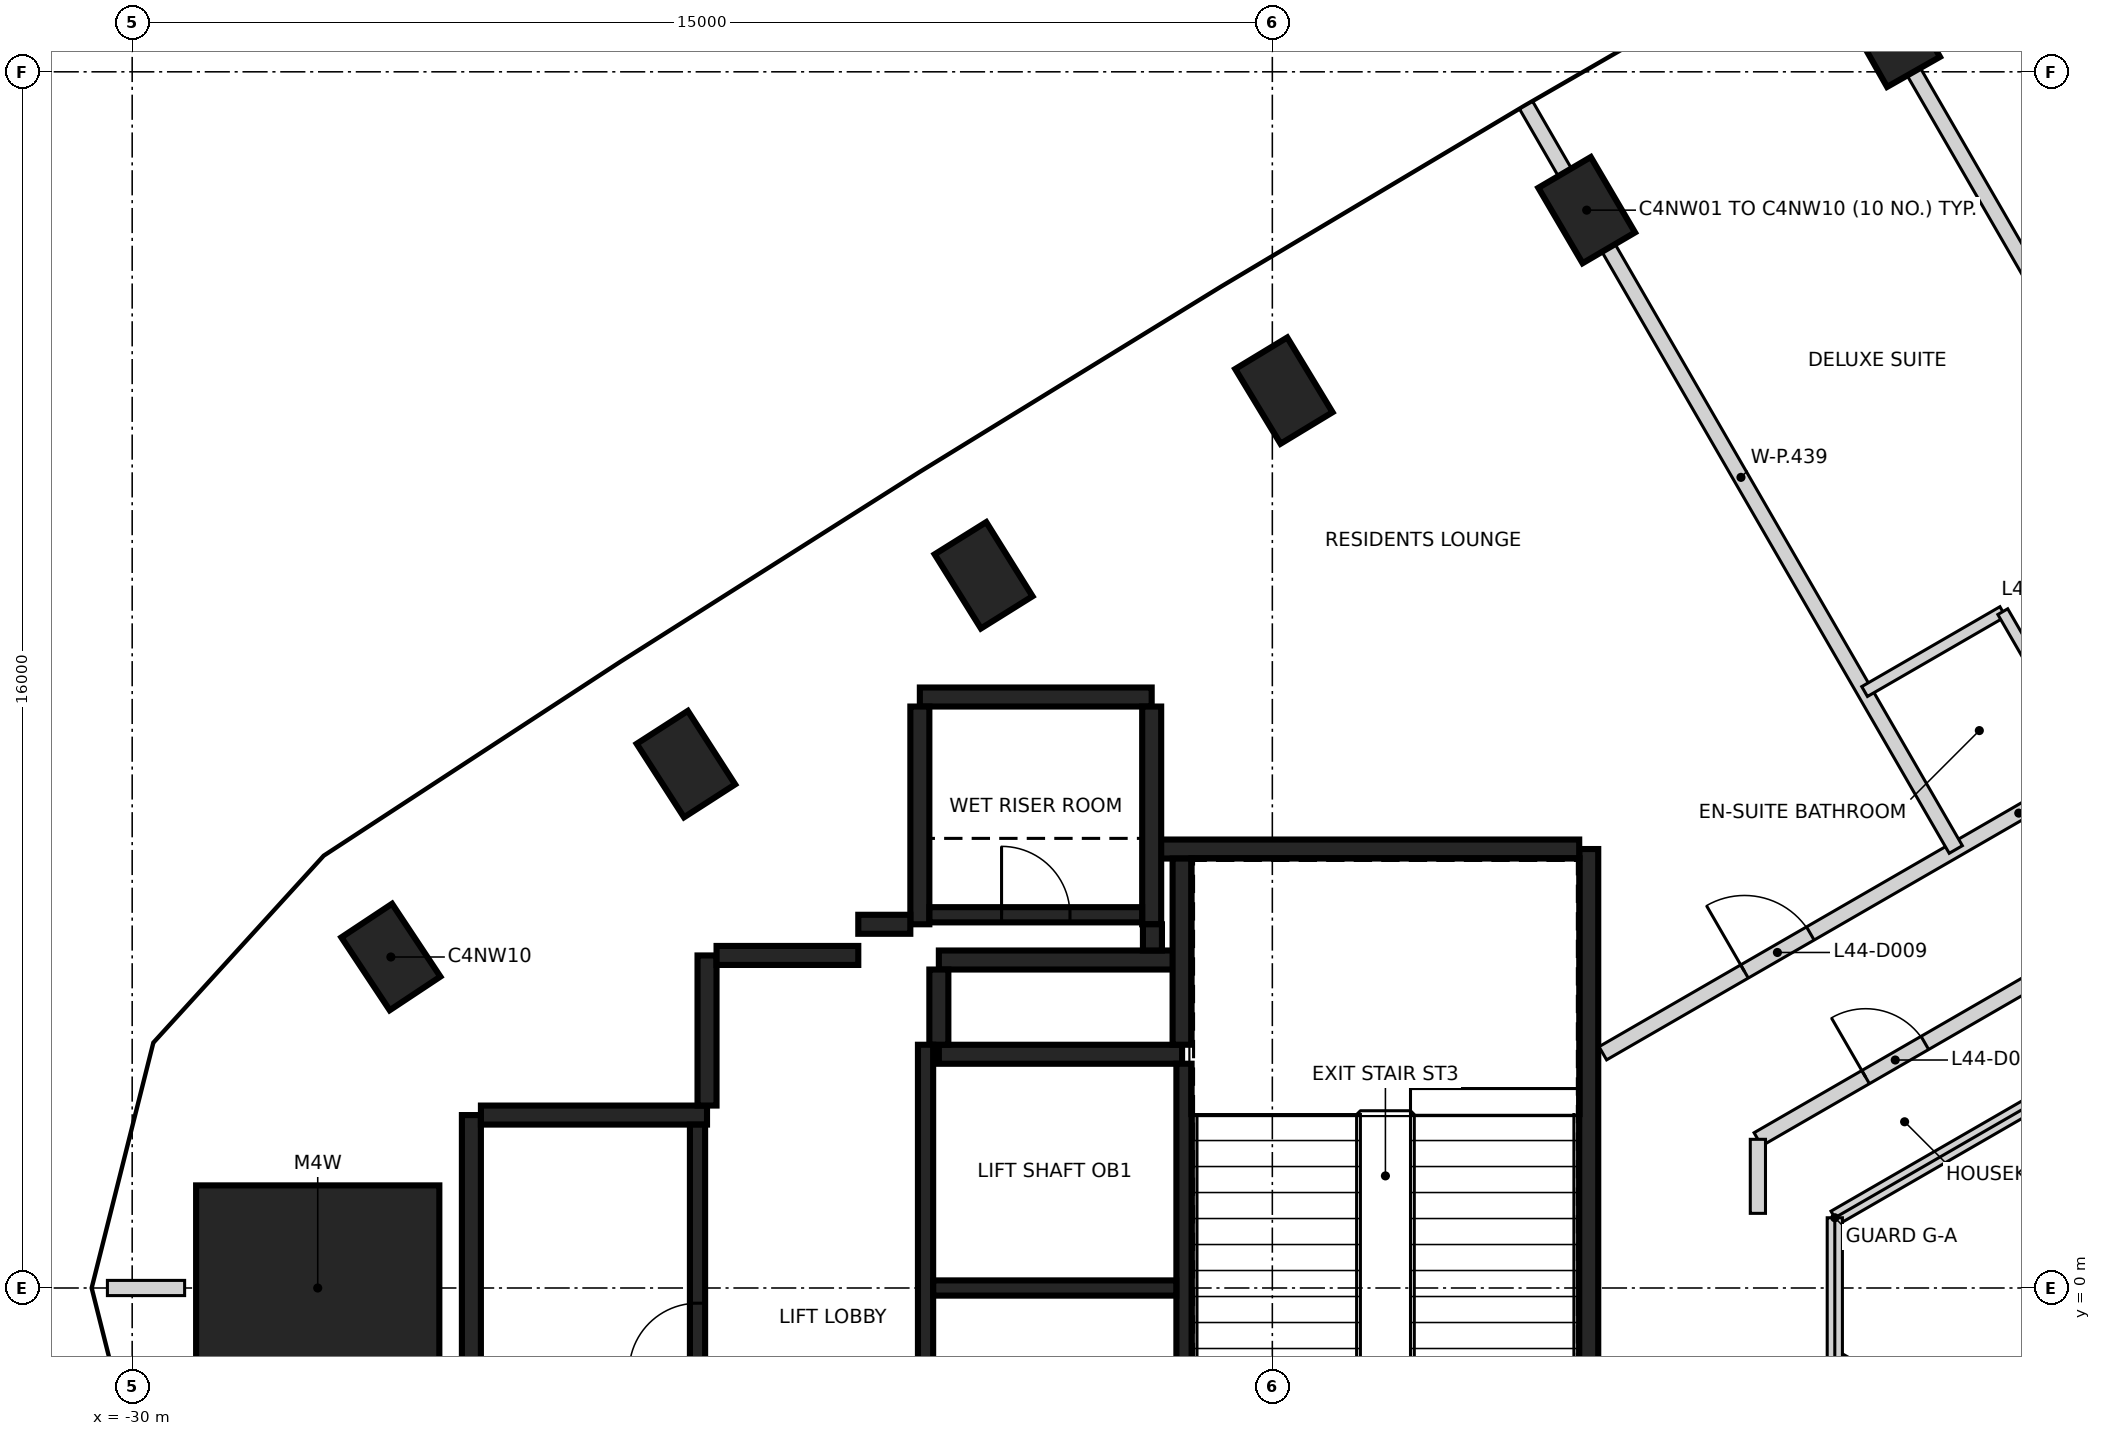
"""IFC4 building model, lengths in metres.
Left out: names, types, materials, properties, quantities, classifications, styles, units other than length and angle.
Written with IfcOpenShell. Run it as: python <this file> out.ifc"""

import sys

from ifc_helpers import new_model, si_unit, direction, frame, frame_2d, origin, origin_2d, place, context, subcontext, project, spatial, rectangle, extrude, element, fill, save


model = new_model("IFC4")
c1 = context("Model", 3, precision=1e-05, world=origin(), true_north=direction((0.0, 1.0)))
c2 = subcontext(c1, "Body", "Model", "MODEL_VIEW")
j1 = project(units=[si_unit("LENGTHUNIT", "METRE"), si_unit("PLANEANGLEUNIT", "RADIAN")], contexts=[c1])
p1 = place(None, origin())
s1 = spatial("IfcSite", under=j1, at=p1, CompositionType="ELEMENT")
p2 = place(p1, origin())
s2 = spatial("IfcBuilding", under=s1, at=p2, CompositionType="ELEMENT")
p3 = place(p2, frame((0.0, 0.0, 179.2)))
s3 = spatial("IfcBuildingStorey", under=s2, at=p3, CompositionType="ELEMENT", Elevation=179.2)
for number, where, z_axis, x_axis in (
    (1, (-6.848, 16.499, -0.35), (0.0, 0.0, 1.0), (-0.494, 0.87, 0.0)),
    (2, (-10.864, 14.18, -0.35), (0.0, 0.0, 1.0), (-0.506, 0.862, 0.0)),
    (3, (-14.848, 11.806, -0.35), (0.0, 0.0, 1.0), (-0.518, 0.855, 0.0)),
    (4, (-18.799, 9.376, -0.35), (0.0, 0.0, 1.0), (-0.529, 0.848, 0.0)),
    (5, (-22.715, 6.892, -0.35), (0.0, 0.0, 1.0), (-0.541, 0.841, 0.0)),
    (6, (-26.597, 4.354, -0.35), (0.0, 0.0, 1.0), (-0.553, 0.833, 0.0)),
):
    element("IfcColumn", number, at=place(p3, frame(where, z_axis=z_axis, x_axis=x_axis)), inside=s3, PredefinedType="COLUMN", context=c2, shape_type="SweptSolid", body=[
        extrude(rectangle(XDim=1.15, YDim=0.8, at=origin_2d()), origin(), (0.0, 0.0, 1.0), 3.6),
    ])
p4 = place(p3, frame((-27.559, 0.0, -0.35), z_axis=(0.0, 0.0, 1.0), x_axis=(1.0, 0.0, 0.0)))
e7 = element("IfcColumn", 7, at=p4, inside=s3, PredefinedType="COLUMN", context=c2, shape_type="SweptSolid", body=[
    extrude(rectangle(XDim=3.2, YDim=2.7, at=origin_2d()), origin(), (0.0, 0.0, 1.0), 3.6),
])
p5 = place(p3, frame((-10.837, 5.775, 0.0), z_axis=(0.0, 0.0, 1.0), x_axis=(0.0, -1.0, 0.0)))
e8 = element("IfcWall", 8, at=p5, inside=s3, PredefinedType="SHEAR", context=c2, shape_type="SweptSolid", body=[
    extrude(rectangle(XDim=11.55, YDim=0.25, at=frame_2d((5.775, 0.0))), origin(), (0.0, 0.0, 1.0), 3.25),
])
p6 = place(p5, frame((10.025, 0.0, 0.0)))
e9 = element("IfcOpeningElement", 9, at=p6, cuts=e8, PredefinedType="OPENING", context=c2, shape_type="SweptSolid", body=[
    extrude(rectangle(XDim=1.2, YDim=2.1, at=frame_2d((0.6, 1.05))), frame((0.0, 0.135, 0.0), z_axis=(0.0, -1.0, 0.0), x_axis=(1.0, 0.0, 0.0)), (0.0, 0.0, 1.0), 0.27),
])
p7 = place(p5, frame((8.725, 0.0, 0.0)))
e10 = element("IfcOpeningElement", 10, at=p7, cuts=e8, PredefinedType="OPENING", context=c2, shape_type="SweptSolid", body=[
    extrude(rectangle(XDim=1.2, YDim=2.1, at=frame_2d((0.6, 1.05))), frame((0.0, 0.135, 0.0), z_axis=(0.0, -1.0, 0.0), x_axis=(1.0, 0.0, 0.0)), (0.0, 0.0, 1.0), 0.27),
])
p8 = place(p3, frame((-25.537, -3.575, 0.0), z_axis=(0.0, 0.0, 1.0), x_axis=(0.0, 1.0, 0.0)))
e11 = element("IfcWall", 11, at=p8, inside=s3, PredefinedType="SHEAR", context=c2, shape_type="SweptSolid", body=[
    extrude(rectangle(XDim=5.85, YDim=0.25, at=frame_2d((2.925, 0.0))), origin(), (0.0, 0.0, 1.0), 3.25),
])
p9 = place(p3, frame((-16.472, 5.775, 0.0), z_axis=(0.0, 0.0, 1.0), x_axis=(1.0, 0.0, 0.0)))
e12 = element("IfcWall", 12, at=p9, inside=s3, PredefinedType="SHEAR", context=c2, shape_type="SweptSolid", body=[
    extrude(rectangle(XDim=5.51, YDim=0.25, at=frame_2d((2.755, 0.0))), origin(), (0.0, 0.0, 1.0), 3.25),
])
p10 = place(p3, frame((-19.387, 3.075, 0.0), z_axis=(0.0, 0.0, 1.0), x_axis=(1.0, 0.0, 0.0)))
e13 = element("IfcWall", 13, at=p10, inside=s3, PredefinedType="SHEAR", context=c2, shape_type="SweptSolid", body=[
    extrude(rectangle(XDim=3.2, YDim=0.25, at=frame_2d((1.6, 0.0))), origin(), (0.0, 0.0, 1.0), 3.25),
])
p11 = place(p3, frame((-25.412, 2.275, 0.0), z_axis=(0.0, 0.0, 1.0), x_axis=(1.0, 0.0, 0.0)))
e14 = element("IfcWall", 14, at=p11, inside=s3, PredefinedType="SHEAR", context=c2, shape_type="SweptSolid", body=[
    extrude(rectangle(XDim=2.975, YDim=0.25, at=frame_2d((1.487, 0.0))), origin(), (0.0, 0.0, 1.0), 3.25),
])
p12 = place(p3, frame((-19.637, 7.775, 0.0), z_axis=(0.0, 0.0, 1.0), x_axis=(1.0, 0.0, 0.0)))
e15 = element("IfcWall", 15, at=p12, inside=s3, PredefinedType="SHEAR", context=c2, shape_type="SweptSolid", body=[
    extrude(rectangle(XDim=3.05, YDim=0.25, at=frame_2d((1.525, 0.0))), origin(), (0.0, 0.0, 1.0), 3.25),
])
for number, where, z_axis, x_axis in (
    (16, (-16.587, 7.65, 0.0), (0.0, 0.0, 1.0), (0.0, -1.0, 0.0)),
    (17, (-19.637, 4.785, 0.0), (0.0, 0.0, 1.0), (0.0, 1.0, 0.0)),
):
    element("IfcWall", number, at=place(p3, frame(where, z_axis=z_axis, x_axis=x_axis)), inside=s3, PredefinedType="SHEAR", context=c2, shape_type="SweptSolid", body=[
        extrude(rectangle(XDim=2.865, YDim=0.25, at=frame_2d((1.432, 0.0))), origin(), (0.0, 0.0, 1.0), 3.25),
    ])
p13 = place(p3, frame((-16.302, 4.315, 0.0), z_axis=(0.0, 0.0, 1.0), x_axis=(-1.0, 0.0, 0.0)))
e18 = element("IfcWall", 18, at=p13, inside=s3, PredefinedType="SHEAR", context=c2, shape_type="SweptSolid", body=[
    extrude(rectangle(XDim=3.085, YDim=0.25, at=frame_2d((1.542, 0.0))), origin(), (0.0, 0.0, 1.0), 3.25),
])
p14 = place(p3, frame((-16.187, 3.2, 0.0), z_axis=(0.0, 0.0, 1.0), x_axis=(0.0, 1.0, 0.0)))
e19 = element("IfcWall", 19, at=p14, inside=s3, PredefinedType="SHEAR", context=c2, shape_type="SweptSolid", body=[
    extrude(rectangle(XDim=2.449, YDim=0.25, at=frame_2d((1.225, 0.0))), origin(), (0.0, 0.0, 1.0), 3.25),
])
p15 = place(p3, frame((-22.437, 2.4, 0.0), z_axis=(0.0, 0.0, 1.0), x_axis=(0.0, 1.0, 0.0)))
e20 = element("IfcWall", 20, at=p15, inside=s3, PredefinedType="SHEAR", context=c2, shape_type="SweptSolid", body=[
    extrude(rectangle(XDim=1.975, YDim=0.25, at=frame_2d((0.987, 0.0))), origin(), (0.0, 0.0, 1.0), 3.25),
])
p16 = place(p3, frame((-22.312, 4.375, 0.0), z_axis=(0.0, 0.0, 1.0), x_axis=(1.0, 0.0, 0.0)))
e21 = element("IfcWall", 21, at=p16, inside=s3, PredefinedType="SHEAR", context=c2, shape_type="SweptSolid", body=[
    extrude(rectangle(XDim=1.865, YDim=0.25, at=frame_2d((0.932, 0.0))), origin(), (0.0, 0.0, 1.0), 3.25),
])
p17 = place(p3, frame((-19.387, 4.19, 0.0), z_axis=(0.0, 0.0, 1.0), x_axis=(0.0, -1.0, 0.0)))
e22 = element("IfcWall", 22, at=p17, inside=s3, PredefinedType="SHEAR", context=c2, shape_type="SweptSolid", body=[
    extrude(rectangle(XDim=0.989, YDim=0.25, at=frame_2d((0.495, 0.0))), origin(), (0.0, 0.0, 1.0), 3.25),
])
p18 = place(p3, frame((-20.447, 4.785, 0.0), z_axis=(0.0, 0.0, 1.0), x_axis=(1.0, 0.0, 0.0)))
e23 = element("IfcWall", 23, at=p18, inside=s3, PredefinedType="SHEAR", context=c2, shape_type="SweptSolid", body=[
    extrude(rectangle(XDim=0.685, YDim=0.25, at=frame_2d((0.342, 0.0))), origin(), (0.0, 0.0, 1.0), 3.25),
])
p19 = place(p3, frame((-16.577, 4.785, 0.0), z_axis=(0.0, 0.0, 1.0), x_axis=(0.0, -1.0, 0.0)))
e24 = element("IfcWall", 24, at=p19, inside=s3, PredefinedType="SHEAR", context=c2, shape_type="SweptSolid", body=[
    extrude(rectangle(XDim=0.344, YDim=0.25, at=frame_2d((0.172, 0.0))), origin(), (0.0, 0.0, 1.0), 3.25),
])
p20 = place(p3, frame((-16.162, 2.951, 0.0), z_axis=(0.0, 0.0, 1.0), x_axis=(0.0, -1.0, 0.0)))
e25 = element("IfcWall", 25, at=p20, inside=s3, PredefinedType="SHEAR", context=c2, shape_type="SweptSolid", body=[
    extrude(rectangle(XDim=5.851, YDim=0.2, at=frame_2d((2.925, 0.0))), origin(), (0.0, 0.0, 1.0), 3.25),
])
p21 = place(p3, frame((-19.562, -2.9, 0.0), z_axis=(0.0, 0.0, 1.0), x_axis=(0.0, 1.0, 0.0)))
e26 = element("IfcWall", 26, at=p21, inside=s3, PredefinedType="SHEAR", context=c2, shape_type="SweptSolid", body=[
    extrude(rectangle(XDim=6.1, YDim=0.2, at=frame_2d((3.05, 0.0))), origin(), (0.0, 0.0, 1.0), 3.25),
])
p22 = place(p3, frame((-22.562, -3.449, 0.0), z_axis=(0.0, 0.0, 1.0), x_axis=(0.0, 1.0, 0.0)))
e27 = element("IfcWall", 27, at=p22, inside=s3, PredefinedType="SHEAR", context=c2, shape_type="SweptSolid", body=[
    extrude(rectangle(XDim=5.598, YDim=0.2, at=frame_2d((2.799, 0.0))), origin(), (0.0, 0.0, 1.0), 3.25),
])
p23 = place(p22, frame((2.349, 0.0, 0.0)))
e28 = element("IfcOpeningElement", 28, at=p23, cuts=e27, PredefinedType="OPENING", context=c2, shape_type="SweptSolid", body=[
    extrude(rectangle(XDim=0.9, YDim=2.1, at=frame_2d((0.45, 1.05))), frame((0.0, 0.11, 0.0), z_axis=(0.0, -1.0, 0.0), x_axis=(1.0, 0.0, 0.0)), (0.0, 0.0, 1.0), 0.22),
])
p24 = place(p3, frame((-16.263, 0.0, 0.0), z_axis=(0.0, 0.0, 1.0), x_axis=(-1.0, 0.0, 0.0)))
e29 = element("IfcWall", 29, at=p24, inside=s3, PredefinedType="SHEAR", context=c2, shape_type="SweptSolid", body=[
    extrude(rectangle(XDim=3.198, YDim=0.2, at=frame_2d((1.599, 0.0))), origin(), (0.0, 0.0, 1.0), 3.25),
])
p25 = place(p3, frame((-19.511, 4.91, 0.0), z_axis=(0.0, 0.0, 1.0), x_axis=(1.0, 0.0, 0.0)))
e30 = element("IfcWall", 30, at=p25, inside=s3, PredefinedType="SHEAR", context=c2, shape_type="SweptSolid", body=[
    extrude(rectangle(XDim=2.798, YDim=0.2, at=frame_2d((1.399, 0.0))), origin(), (0.0, 0.0, 1.0), 3.25),
])
p26 = place(p25, frame((0.949, 0.0, 0.0)))
e31 = element("IfcOpeningElement", 31, at=p26, cuts=e30, PredefinedType="OPENING", context=c2, shape_type="SweptSolid", body=[
    extrude(rectangle(XDim=0.9, YDim=2.1, at=frame_2d((0.45, 1.05))), frame((0.0, 0.11, 0.0), z_axis=(0.0, -1.0, 0.0), x_axis=(1.0, 0.0, 0.0)), (0.0, 0.0, 1.0), 0.22),
])
p27 = place(p3, frame((-10.652, 3.088, 0.0), z_axis=(0.0, 0.0, 1.0), x_axis=(0.866031821623, 0.499988883812, 0.0)))
e32 = element("IfcWall", 32, at=p27, inside=s3, PredefinedType="PARTITIONING", context=c2, shape_type="SweptSolid", body=[
    extrude(rectangle(XDim=12.638, YDim=0.2, at=frame_2d((6.319, 0.0))), origin(), (0.0, 0.0, 1.0), 3.25),
])
p28 = place(p27, frame((10.813, 0.0, 0.0)))
e33 = element("IfcOpeningElement", 33, at=p28, cuts=e32, PredefinedType="OPENING", context=c2, shape_type="SweptSolid", body=[
    extrude(rectangle(XDim=1.0, YDim=2.1, at=frame_2d((0.5, 1.05))), frame((0.0, 0.11, 0.0), z_axis=(0.0, -1.0, 0.0), x_axis=(1.0, 0.0, 0.0)), (0.0, 0.0, 1.0), 0.22),
])
p29 = place(p27, frame((8.862, 0.0, 0.0)))
e34 = element("IfcOpeningElement", 34, at=p29, cuts=e32, PredefinedType="OPENING", context=c2, shape_type="SweptSolid", body=[
    extrude(rectangle(XDim=0.95, YDim=2.1, at=frame_2d((0.475, 1.05))), frame((0.0, 0.11, 0.0), z_axis=(0.0, -1.0, 0.0), x_axis=(1.0, 0.0, 0.0)), (0.0, 0.0, 1.0), 0.22),
])
p30 = place(p27, frame((2.153, 0.0, 0.0)))
e35 = element("IfcOpeningElement", 35, at=p30, cuts=e32, PredefinedType="OPENING", context=c2, shape_type="SweptSolid", body=[
    extrude(rectangle(XDim=1.0, YDim=2.1, at=frame_2d((0.5, 1.05))), frame((0.0, 0.11, 0.0), z_axis=(0.0, -1.0, 0.0), x_axis=(1.0, 0.0, 0.0)), (0.0, 0.0, 1.0), 0.22),
])
p31 = place(p3, frame((-8.612, 1.956, 0.0), z_axis=(0.0, 0.0, 1.0), x_axis=(0.866034386606, 0.499984440973, 0.0)))
e36 = element("IfcWall", 36, at=p31, inside=s3, PredefinedType="PARTITIONING", context=c2, shape_type="SweptSolid", body=[
    extrude(rectangle(XDim=12.96, YDim=0.2, at=frame_2d((6.48, 0.0))), origin(), (0.0, 0.0, 1.0), 3.25),
])
p32 = place(p31, frame((8.105, 0.0, 0.0)))
e37 = element("IfcOpeningElement", 37, at=p32, cuts=e36, PredefinedType="OPENING", context=c2, shape_type="SweptSolid", body=[
    extrude(rectangle(XDim=0.9, YDim=2.1, at=frame_2d((0.45, 1.05))), frame((0.0, 0.11, 0.0), z_axis=(0.0, -1.0, 0.0), x_axis=(1.0, 0.0, 0.0)), (0.0, 0.0, 1.0), 0.22),
])
p33 = place(p31, frame((1.637, 0.0, 0.0)))
e38 = element("IfcOpeningElement", 38, at=p33, cuts=e36, PredefinedType="OPENING", context=c2, shape_type="SweptSolid", body=[
    extrude(rectangle(XDim=0.9, YDim=2.1, at=frame_2d((0.45, 1.05))), frame((0.0, 0.11, 0.0), z_axis=(0.0, -1.0, 0.0), x_axis=(1.0, 0.0, 0.0)), (0.0, 0.0, 1.0), 0.22),
])
p34 = place(p3, frame((-8.612, 0.982, 0.0), z_axis=(0.0, 0.0, 1.0), x_axis=(0.0, 1.0, 0.0)))
e39 = element("IfcWall", 39, at=p34, inside=s3, PredefinedType="PARTITIONING", context=c2, shape_type="SweptSolid", body=[
    extrude(rectangle(XDim=0.974, YDim=0.2, at=frame_2d((0.487, 0.0))), origin(), (0.0, 0.0, 1.0), 3.25),
])
p35 = place(p3, frame((-30.326, 0.0, 0.0), z_axis=(0.0, 0.0, 1.0), x_axis=(1.0, 0.0, 0.0)))
e40 = element("IfcWall", 40, at=p35, inside=s3, PredefinedType="PARTITIONING", context=c2, shape_type="SweptSolid", body=[
    extrude(rectangle(XDim=1.016, YDim=0.2, at=frame_2d((0.508, 0.0))), origin(), (0.0, 0.0, 1.0), 3.25),
])
p36 = place(p3, frame((-11.661, 15.561, 0.0), z_axis=(0.0, 0.0, 1.0), x_axis=(0.499987250653, -0.866032764498, 0.0)))
e41 = element("IfcWall", 41, at=p36, inside=s3, PredefinedType="PARTITIONING", context=c2, shape_type="SweptSolid", body=[
    extrude(rectangle(XDim=11.306, YDim=0.2, at=frame_2d((5.653, 0.0))), origin(), (0.0, 0.0, 1.0), 3.25),
])
for number, where, z_axis, x_axis in (
    (42, (-7.6, 0.924, 0.0), (0.0, 0.0, 1.0), (0.866, 0.5, 0.0)),
    (43, (-7.6, -0.924, 0.0), (0.0, 0.0, 1.0), (0.866, -0.5, 0.0)),
):
    element("IfcWall", number, at=place(p3, frame(where, z_axis=z_axis, x_axis=x_axis)), inside=s3, PredefinedType="PARTITIONING", context=c2, shape_type="SweptSolid", body=[
        extrude(rectangle(XDim=12.24, YDim=0.2, at=frame_2d((6.12, 0.0))), origin(), (0.0, 0.0, 1.0), 3.25),
    ])
p37 = place(p3, frame((-7.6, -0.924, 0.0), z_axis=(0.0, 0.0, 1.0), x_axis=(0.0, 1.0, 0.0)))
e44 = element("IfcWall", 44, at=p37, inside=s3, PredefinedType="PARTITIONING", context=c2, shape_type="SweptSolid", body=[
    extrude(rectangle(XDim=1.848, YDim=0.2, at=frame_2d((0.924, 0.0))), origin(), (0.0, 0.0, 1.0), 3.25),
])
p38 = place(p3, frame((-7.646, 17.879, 0.0), z_axis=(0.0, 0.0, 1.0), x_axis=(0.500047691386, -0.865997867399, 0.0)))
e45 = element("IfcWall", 45, at=p38, inside=s3, PredefinedType="PARTITIONING", context=c2, shape_type="SweptSolid", body=[
    extrude(rectangle(XDim=11.306, YDim=0.2, at=frame_2d((5.653, 0.0))), origin(), (0.0, 0.0, 1.0), 3.25),
])
p39 = place(p3, frame((-7.208, 7.847, 0.0), z_axis=(0.0, 0.0, 1.0), x_axis=(0.865749785376, 0.500477081515, 0.0)))
e46 = element("IfcWall", 46, at=p39, inside=s3, PredefinedType="PARTITIONING", context=c2, shape_type="SweptSolid", body=[
    extrude(rectangle(XDim=2.1, YDim=0.15, at=frame_2d((1.05, 0.0))), origin(), (0.0, 0.0, 1.0), 3.25),
])
p40 = place(p3, frame((-5.39, 8.898, 0.0), z_axis=(0.0, 0.0, 1.0), x_axis=(0.500218298882, -0.865899332177, 0.0)))
e47 = element("IfcWall", 47, at=p40, inside=s3, PredefinedType="PARTITIONING", context=c2, shape_type="SweptSolid", body=[
    extrude(rectangle(XDim=2.401, YDim=0.15, at=frame_2d((1.2, 0.0))), origin(), (0.0, 0.0, 1.0), 3.25),
])
p41 = place(p40, frame((0.801, 0.0, 0.0)))
e48 = element("IfcOpeningElement", 48, at=p41, cuts=e47, PredefinedType="OPENING", context=c2, shape_type="SweptSolid", body=[
    extrude(rectangle(XDim=0.8, YDim=2.1, at=frame_2d((0.4, 1.05))), frame((0.0, 0.085, 0.0), z_axis=(0.0, -1.0, 0.0), x_axis=(1.0, 0.0, 0.0)), (0.0, 0.0, 1.0), 0.17),
])
p42 = place(p23, origin())
e49 = element("IfcDoor", 49, at=p42, inside=s3, OperationType="SINGLE_SWING_RIGHT", PredefinedType="DOOR", context=c2, shape_type="SweptSolid", body=[
    extrude(rectangle(XDim=0.9, YDim=2.1, at=frame_2d((0.45, 1.05))), frame((0.0, 0.025, 0.0), z_axis=(0.0, -1.0, 0.0), x_axis=(1.0, 0.0, 0.0)), (0.0, 0.0, 1.0), 0.05),
])
fill(e28, e49)
p43 = place(p26, origin())
e50 = element("IfcDoor", 50, at=p43, inside=s3, OperationType="SINGLE_SWING_LEFT", PredefinedType="DOOR", context=c2, shape_type="SweptSolid", body=[
    extrude(rectangle(XDim=0.9, YDim=2.1, at=frame_2d((0.45, 1.05))), frame((0.0, 0.025, 0.0), z_axis=(0.0, -1.0, 0.0), x_axis=(1.0, 0.0, 0.0)), (0.0, 0.0, 1.0), 0.05),
])
fill(e31, e50)
p44 = place(p30, origin())
e51 = element("IfcDoor", 51, at=p44, inside=s3, OperationType="SINGLE_SWING_LEFT", PredefinedType="DOOR", context=c2, shape_type="SweptSolid", body=[
    extrude(rectangle(XDim=1.0, YDim=2.1, at=frame_2d((0.5, 1.05))), frame((0.0, 0.025, 0.0), z_axis=(0.0, -1.0, 0.0), x_axis=(1.0, 0.0, 0.0)), (0.0, 0.0, 1.0), 0.05),
])
fill(e35, e51)
p45 = place(p33, frame((0.9, 0.0, 0.0), z_axis=(0.0, 0.0, 1.0), x_axis=(-1.0, 0.0, 0.0)))
e52 = element("IfcDoor", 52, at=p45, inside=s3, OperationType="SINGLE_SWING_LEFT", PredefinedType="DOOR", context=c2, shape_type="SweptSolid", body=[
    extrude(rectangle(XDim=0.9, YDim=2.1, at=frame_2d((0.45, 1.05))), frame((0.0, 0.025, 0.0), z_axis=(0.0, -1.0, 0.0), x_axis=(1.0, 0.0, 0.0)), (0.0, 0.0, 1.0), 0.05),
])
fill(e38, e52)
save(model, sys.argv[1])
